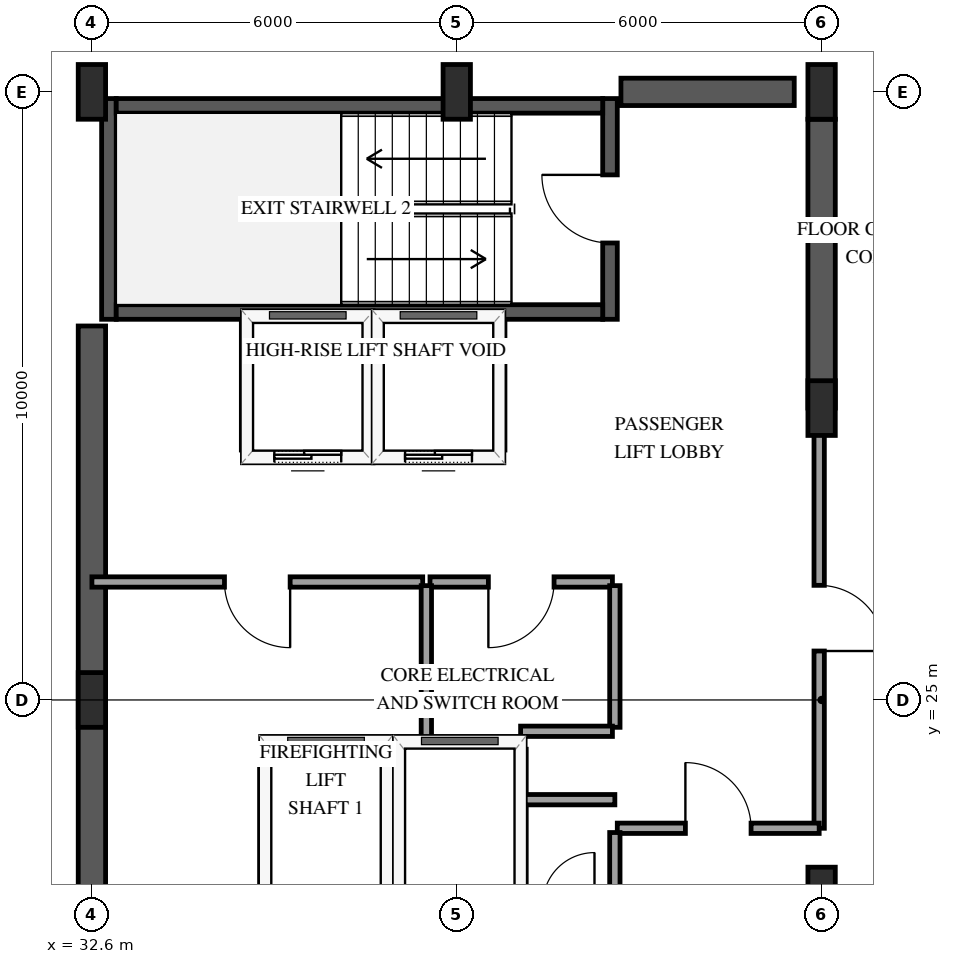
"""IFC4 building model, lengths in metres.
Left out: names, types, materials, properties, quantities, classifications, styles, units other than length and angle.
Written with IfcOpenShell. Run it as: python <this file> out.ifc"""

import sys

from ifc_helpers import new_model, si_unit, direction, frame, frame_2d, origin, origin_2d, place, context, subcontext, project, spatial, rectangle, extrude, element, fill, save


model = new_model("IFC4")
c1 = context("Model", 3, precision=1e-05, world=origin(), true_north=direction((0.0, 1.0)))
c2 = subcontext(c1, "Body", "Model", "MODEL_VIEW")
j1 = project(units=[si_unit("LENGTHUNIT", "METRE"), si_unit("PLANEANGLEUNIT", "RADIAN")], contexts=[c1])
p1 = place(None, origin())
s1 = spatial("IfcSite", under=j1, at=p1, CompositionType="ELEMENT")
p2 = place(p1, origin())
s2 = spatial("IfcBuilding", under=s1, at=p2, CompositionType="ELEMENT")
p3 = place(p2, frame((0.0, 0.0, 276.25)))
s3 = spatial("IfcBuildingStorey", under=s2, at=p3, CompositionType="ELEMENT", Elevation=276.25)
p4 = place(p3, frame((32.88, 31.26, 0.0), z_axis=(0.0, 0.0, 1.0), x_axis=(0.0, 1.0, 0.0)))
e1 = element("IfcWall", 1, at=p4, inside=s3, PredefinedType="SHEAR", context=c2, shape_type="SweptSolid", body=[
    extrude(rectangle(XDim=3.63, YDim=0.24, at=frame_2d((1.815, 0.0))), origin(), (0.0, 0.0, 1.0), 3.75),
])
p5 = place(p3, frame((41.12, 31.26, 0.0), z_axis=(0.0, 0.0, 1.0), x_axis=(0.0, 1.0, 0.0)))
e2 = element("IfcWall", 2, at=p5, inside=s3, PredefinedType="SHEAR", context=c2, shape_type="SweptSolid", body=[
    extrude(rectangle(XDim=3.63, YDim=0.24, at=frame_2d((1.815, 0.0))), origin(), (0.0, 0.0, 1.0), 3.75),
])
p6 = place(p5, frame((1.255, 0.0, 0.0)))
e3 = element("IfcOpeningElement", 3, at=p6, cuts=e2, PredefinedType="OPENING", context=c2, shape_type="SweptSolid", body=[
    extrude(rectangle(XDim=1.12, YDim=2.15, at=frame_2d((0.56, 1.075))), frame((0.0, 0.13, 0.0), z_axis=(0.0, -1.0, 0.0), x_axis=(1.0, 0.0, 0.0)), (0.0, 0.0, 1.0), 0.26),
])
for number, where, z_axis, x_axis in (
    (4, (33.0, 31.38, 0.0), (0.0, 0.0, 1.0), (1.0, 0.0, 0.0)),
    (5, (33.0, 34.77, 0.0), (0.0, 0.0, 1.0), (1.0, 0.0, 0.0)),
):
    element("IfcWall", number, at=place(p3, frame(where, z_axis=z_axis, x_axis=x_axis)), inside=s3, PredefinedType="SHEAR", context=c2, shape_type="SweptSolid", body=[
        extrude(rectangle(XDim=8.0, YDim=0.24, at=frame_2d((4.0, 0.0))), origin(), (0.0, 0.0, 1.0), 3.75),
    ])
p7 = place(p3, frame((32.6, 18.85, 0.0), z_axis=(0.0, 0.0, 1.0), x_axis=(0.0, 1.0, 0.0)))
e6 = element("IfcWall", 6, at=p7, inside=s3, PredefinedType="SHEAR", context=c2, shape_type="SweptSolid", body=[
    extrude(rectangle(XDim=12.3, YDim=0.45, at=frame_2d((6.15, 0.0))), origin(), (0.0, 0.0, 1.0), 3.75),
])
p8 = place(p3, frame((41.3, 35.0, 0.0), z_axis=(0.0, 0.0, 1.0), x_axis=(1.0, 0.0, 0.0)))
e7 = element("IfcWall", 7, at=p8, inside=s3, PredefinedType="SHEAR", context=c2, shape_type="SweptSolid", body=[
    extrude(rectangle(XDim=2.85, YDim=0.45, at=frame_2d((1.425, 0.0))), origin(), (0.0, 0.0, 1.0), 3.75),
])
p9 = place(p3, frame((44.6, 29.8, 0.0), z_axis=(0.0, 0.0, 1.0), x_axis=(0.0, 1.0, 0.0)))
e8 = element("IfcWall", 8, at=p9, inside=s3, PredefinedType="SHEAR", context=c2, shape_type="SweptSolid", body=[
    extrude(rectangle(XDim=4.75, YDim=0.45, at=frame_2d((2.375, 0.0))), origin(), (0.0, 0.0, 1.0), 3.75),
])
for number, where, z_axis, x_axis in (
    (9, (32.6, 25.0, 0.0), (0.0, 0.0, 1.0), (1.0, 0.0, 0.0)),
    (10, (32.6, 35.0, 0.0), (0.0, 0.0, 1.0), (1.0, 0.0, 0.0)),
    (11, (38.6, 35.0, 0.0), (0.0, 0.0, 1.0), (1.0, 0.0, 0.0)),
    (12, (44.6, 21.8, 0.0), (0.0, 0.0, 1.0), (1.0, 0.0, 0.0)),
    (13, (44.6, 29.8, 0.0), (0.0, 0.0, 1.0), (1.0, 0.0, 0.0)),
    (14, (44.6, 35.0, 0.0), (0.0, 0.0, 1.0), (1.0, 0.0, 0.0)),
):
    element("IfcColumn", number, at=place(p3, frame(where, z_axis=z_axis, x_axis=x_axis)), inside=s3, PredefinedType="PILASTER", context=c2, shape_type="SweptSolid", body=[
        extrude(rectangle(XDim=0.45, YDim=0.9, at=origin_2d()), origin(), (0.0, 0.0, 1.0), 3.75),
    ])
p10 = place(p3, frame((35.45, 24.3, 0.0), z_axis=(0.0, 0.0, 1.0), x_axis=(1.0, 0.0, 0.0)))
e15 = element("IfcWall", 15, at=p10, inside=s3, PredefinedType="SOLIDWALL", context=c2, shape_type="SweptSolid", body=[
    extrude(rectangle(XDim=2.0, YDim=0.185, at=frame_2d((1.0, 0.0))), origin(), (0.0, 0.0, 1.0), 3.45),
])
for number, where, z_axis, x_axis in (
    (16, (35.45, 21.81, 0.0), (0.0, 0.0, 1.0), (0.0, 1.0, 0.0)),
    (17, (37.45, 21.81, 0.0), (0.0, 0.0, 1.0), (0.0, 1.0, 0.0)),
):
    element("IfcWall", number, at=place(p3, frame(where, z_axis=z_axis, x_axis=x_axis)), inside=s3, PredefinedType="SOLIDWALL", context=c2, shape_type="SweptSolid", body=[
        extrude(rectangle(XDim=2.38, YDim=0.185, at=frame_2d((1.19, 0.0))), origin(), (0.0, 0.0, 1.0), 3.45),
    ])
p11 = place(p3, frame((37.65, 24.3, 0.0), z_axis=(0.0, 0.0, 1.0), x_axis=(1.0, 0.0, 0.0)))
e18 = element("IfcWall", 18, at=p11, inside=s3, PredefinedType="SOLIDWALL", context=c2, shape_type="SweptSolid", body=[
    extrude(rectangle(XDim=2.0, YDim=0.185, at=frame_2d((1.0, 0.0))), origin(), (0.0, 0.0, 1.0), 3.45),
])
p12 = place(p3, frame((39.65, 21.81, 0.0), z_axis=(0.0, 0.0, 1.0), x_axis=(0.0, 1.0, 0.0)))
e19 = element("IfcWall", 19, at=p12, inside=s3, PredefinedType="SOLIDWALL", context=c2, shape_type="SweptSolid", body=[
    extrude(rectangle(XDim=2.38, YDim=0.185, at=frame_2d((1.19, 0.0))), origin(), (0.0, 0.0, 1.0), 3.45),
])
p13 = place(p3, frame((35.15, 29.0, 0.0), z_axis=(0.0, 0.0, 1.0), x_axis=(1.0, 0.0, 0.0)))
e20 = element("IfcWall", 20, at=p13, inside=s3, PredefinedType="SOLIDWALL", context=c2, shape_type="SweptSolid", body=[
    extrude(rectangle(XDim=2.0, YDim=0.185, at=frame_2d((1.0, 0.0))), origin(), (0.0, 0.0, 1.0), 3.45),
])
p14 = place(p13, frame((0.45, 0.0, 0.0)))
e21 = element("IfcOpeningElement", 21, at=p14, cuts=e20, PredefinedType="OPENING", context=c2, shape_type="SweptSolid", body=[
    extrude(rectangle(XDim=1.1, YDim=2.15, at=frame_2d((0.55, 1.075))), frame((0.0, 0.103, 0.0), z_axis=(0.0, -1.0, 0.0), x_axis=(1.0, 0.0, 0.0)), (0.0, 0.0, 1.0), 0.205),
])
for number, where, z_axis, x_axis in (
    (22, (35.15, 29.11, 0.0), (0.0, 0.0, 1.0), (0.0, 1.0, 0.0)),
    (23, (37.15, 29.11, 0.0), (0.0, 0.0, 1.0), (0.0, 1.0, 0.0)),
):
    element("IfcWall", number, at=place(p3, frame(where, z_axis=z_axis, x_axis=x_axis)), inside=s3, PredefinedType="SOLIDWALL", context=c2, shape_type="SweptSolid", body=[
        extrude(rectangle(XDim=2.1, YDim=0.185, at=frame_2d((1.05, 0.0))), origin(), (0.0, 0.0, 1.0), 3.45),
    ])
p15 = place(p3, frame((37.3, 29.0, 0.0), z_axis=(0.0, 0.0, 1.0), x_axis=(1.0, 0.0, 0.0)))
e24 = element("IfcWall", 24, at=p15, inside=s3, PredefinedType="SOLIDWALL", context=c2, shape_type="SweptSolid", body=[
    extrude(rectangle(XDim=2.0, YDim=0.185, at=frame_2d((1.0, 0.0))), origin(), (0.0, 0.0, 1.0), 3.45),
])
p16 = place(p15, frame((0.45, 0.0, 0.0)))
e25 = element("IfcOpeningElement", 25, at=p16, cuts=e24, PredefinedType="OPENING", context=c2, shape_type="SweptSolid", body=[
    extrude(rectangle(XDim=1.1, YDim=2.15, at=frame_2d((0.55, 1.075))), frame((0.0, 0.103, 0.0), z_axis=(0.0, -1.0, 0.0), x_axis=(1.0, 0.0, 0.0)), (0.0, 0.0, 1.0), 0.205),
])
p17 = place(p3, frame((39.3, 29.11, 0.0), z_axis=(0.0, 0.0, 1.0), x_axis=(0.0, 1.0, 0.0)))
e26 = element("IfcWall", 26, at=p17, inside=s3, PredefinedType="SOLIDWALL", context=c2, shape_type="SweptSolid", body=[
    extrude(rectangle(XDim=2.1, YDim=0.185, at=frame_2d((1.05, 0.0))), origin(), (0.0, 0.0, 1.0), 3.45),
])
p18 = place(p3, frame((44.56, 29.8, 0.0), z_axis=(0.0, 0.0, 1.0), x_axis=(0.0, -1.0, 0.0)))
e27 = element("IfcWall", 27, at=p18, inside=s3, PredefinedType="PARTITIONING", context=c2, shape_type="SweptSolid", body=[
    extrude(rectangle(XDim=6.91, YDim=0.17, at=frame_2d((3.455, 0.0))), origin(), (0.0, 0.0, 1.0), 2.49),
])
p19 = place(p18, frame((2.915, 0.0, 0.0)))
e28 = element("IfcOpeningElement", 28, at=p19, cuts=e27, PredefinedType="OPENING", context=c2, shape_type="SweptSolid", body=[
    extrude(rectangle(XDim=1.08, YDim=2.15, at=frame_2d((0.54, 1.075))), frame((0.0, 0.095, 0.0), z_axis=(0.0, -1.0, 0.0), x_axis=(1.0, 0.0, 0.0)), (0.0, 0.0, 1.0), 0.19),
])
p20 = place(p3, frame((38.04, 26.94, 0.0), z_axis=(0.0, 0.0, 1.0), x_axis=(-1.0, 0.0, 0.0)))
e29 = element("IfcWall", 29, at=p20, inside=s3, PredefinedType="PARTITIONING", context=c2, shape_type="SweptSolid", body=[
    extrude(rectangle(XDim=5.44, YDim=0.17, at=frame_2d((2.72, 0.0))), origin(), (0.0, 0.0, 1.0), 3.45),
])
p21 = place(p20, frame((2.18, 0.0, 0.0)))
e30 = element("IfcOpeningElement", 30, at=p21, cuts=e29, PredefinedType="OPENING", context=c2, shape_type="SweptSolid", body=[
    extrude(rectangle(XDim=1.08, YDim=2.15, at=frame_2d((0.54, 1.075))), frame((0.0, 0.095, 0.0), z_axis=(0.0, -1.0, 0.0), x_axis=(1.0, 0.0, 0.0)), (0.0, 0.0, 1.0), 0.19),
])
p22 = place(p3, frame((41.24, 22.89, 0.0), z_axis=(0.0, 0.0, 1.0), x_axis=(1.0, 0.0, 0.0)))
e31 = element("IfcWall", 31, at=p22, inside=s3, PredefinedType="PARTITIONING", context=c2, shape_type="SweptSolid", body=[
    extrude(rectangle(XDim=3.32, YDim=0.17, at=frame_2d((1.66, 0.0))), origin(), (0.0, 0.0, 1.0), 3.45),
])
p23 = place(p22, frame((1.12, 0.0, 0.0)))
e32 = element("IfcOpeningElement", 32, at=p23, cuts=e31, PredefinedType="OPENING", context=c2, shape_type="SweptSolid", body=[
    extrude(rectangle(XDim=1.08, YDim=2.15, at=frame_2d((0.54, 1.075))), frame((0.0, 0.095, 0.0), z_axis=(0.0, -1.0, 0.0), x_axis=(1.0, 0.0, 0.0)), (0.0, 0.0, 1.0), 0.19),
])
p24 = place(p3, frame((41.16, 26.94, 0.0), z_axis=(0.0, 0.0, 1.0), x_axis=(-1.0, 0.0, 0.0)))
e33 = element("IfcWall", 33, at=p24, inside=s3, PredefinedType="PARTITIONING", context=c2, shape_type="SweptSolid", body=[
    extrude(rectangle(XDim=3.0, YDim=0.17, at=frame_2d((1.5, 0.0))), origin(), (0.0, 0.0, 1.0), 3.45),
])
p25 = place(p24, frame((0.96, 0.0, 0.0)))
e34 = element("IfcOpeningElement", 34, at=p25, cuts=e33, PredefinedType="OPENING", context=c2, shape_type="SweptSolid", body=[
    extrude(rectangle(XDim=1.08, YDim=2.15, at=frame_2d((0.54, 1.075))), frame((0.0, 0.095, 0.0), z_axis=(0.0, -1.0, 0.0), x_axis=(1.0, 0.0, 0.0)), (0.0, 0.0, 1.0), 0.19),
])
p26 = place(p3, frame((38.1, 26.88, 0.0), z_axis=(0.0, 0.0, 1.0), x_axis=(0.0, -1.0, 0.0)))
e35 = element("IfcWall", 35, at=p26, inside=s3, PredefinedType="PARTITIONING", context=c2, shape_type="SweptSolid", body=[
    extrude(rectangle(XDim=2.58, YDim=0.17, at=frame_2d((1.29, 0.0))), origin(), (0.0, 0.0, 1.0), 3.45),
])
p27 = place(p3, frame((41.2, 24.55, 0.0), z_axis=(0.0, 0.0, 1.0), x_axis=(0.0, 1.0, 0.0)))
e36 = element("IfcWall", 36, at=p27, inside=s3, PredefinedType="PARTITIONING", context=c2, shape_type="SweptSolid", body=[
    extrude(rectangle(XDim=2.33, YDim=0.17, at=frame_2d((1.165, 0.0))), origin(), (0.0, 0.0, 1.0), 3.45),
])
p28 = place(p3, frame((39.65, 24.485, 0.0), z_axis=(0.0, 0.0, 1.0), x_axis=(1.0, 0.0, 0.0)))
e37 = element("IfcWall", 37, at=p28, inside=s3, PredefinedType="PARTITIONING", context=c2, shape_type="SweptSolid", body=[
    extrude(rectangle(XDim=1.51, YDim=0.17, at=frame_2d((0.755, 0.0))), origin(), (0.0, 0.0, 1.0), 3.45),
])
p29 = place(p3, frame((41.2, 21.7, 0.0), z_axis=(0.0, 0.0, 1.0), x_axis=(0.0, 1.0, 0.0)))
e38 = element("IfcWall", 38, at=p29, inside=s3, PredefinedType="PARTITIONING", context=c2, shape_type="SweptSolid", body=[
    extrude(rectangle(XDim=1.12, YDim=0.17, at=frame_2d((0.56, 0.0))), origin(), (0.0, 0.0, 1.0), 3.45),
])
p30 = place(p3, frame((41.2, 23.36, 0.0), z_axis=(0.0, 0.0, 1.0), x_axis=(-1.0, 0.0, 0.0)))
e39 = element("IfcWall", 39, at=p30, inside=s3, PredefinedType="PARTITIONING", context=c2, shape_type="SweptSolid", body=[
    extrude(rectangle(XDim=1.48, YDim=0.17, at=frame_2d((0.74, 0.0))), origin(), (0.0, 0.0, 1.0), 3.45),
])
p31 = place(p14, origin())
e40 = element("IfcDoor", 40, at=p31, inside=s3, OperationType="SLIDING_TO_LEFT", PredefinedType="DOOR", context=c2, shape_type="SweptSolid", body=[
    extrude(rectangle(XDim=1.1, YDim=2.15, at=frame_2d((0.55, 1.075))), frame((0.0, 0.025, 0.0), z_axis=(0.0, -1.0, 0.0), x_axis=(1.0, 0.0, 0.0)), (0.0, 0.0, 1.0), 0.05),
])
fill(e21, e40)
p32 = place(p16, origin())
e41 = element("IfcDoor", 41, at=p32, inside=s3, OperationType="SLIDING_TO_LEFT", PredefinedType="DOOR", context=c2, shape_type="SweptSolid", body=[
    extrude(rectangle(XDim=1.1, YDim=2.15, at=frame_2d((0.55, 1.075))), frame((0.0, 0.025, 0.0), z_axis=(0.0, -1.0, 0.0), x_axis=(1.0, 0.0, 0.0)), (0.0, 0.0, 1.0), 0.05),
])
fill(e25, e41)
p33 = place(p6, origin())
e42 = element("IfcDoor", 42, at=p33, inside=s3, OperationType="SINGLE_SWING_RIGHT", PredefinedType="DOOR", context=c2, shape_type="SweptSolid", body=[
    extrude(rectangle(XDim=1.12, YDim=2.15, at=frame_2d((0.56, 1.075))), frame((0.0, 0.025, 0.0), z_axis=(0.0, -1.0, 0.0), x_axis=(1.0, 0.0, 0.0)), (0.0, 0.0, 1.0), 0.05),
])
fill(e3, e42)
p34 = place(p19, origin())
e43 = element("IfcDoor", 43, at=p34, inside=s3, OperationType="SINGLE_SWING_RIGHT", PredefinedType="DOOR", context=c2, shape_type="SweptSolid", body=[
    extrude(rectangle(XDim=1.08, YDim=2.15, at=frame_2d((0.54, 1.075))), frame((0.0, 0.025, 0.0), z_axis=(0.0, -1.0, 0.0), x_axis=(1.0, 0.0, 0.0)), (0.0, 0.0, 1.0), 0.05),
])
fill(e28, e43)
p35 = place(p21, origin())
e44 = element("IfcDoor", 44, at=p35, inside=s3, OperationType="SINGLE_SWING_LEFT", PredefinedType="DOOR", context=c2, shape_type="SweptSolid", body=[
    extrude(rectangle(XDim=1.08, YDim=2.15, at=frame_2d((0.54, 1.075))), frame((0.0, 0.025, 0.0), z_axis=(0.0, -1.0, 0.0), x_axis=(1.0, 0.0, 0.0)), (0.0, 0.0, 1.0), 0.05),
])
fill(e30, e44)
p36 = place(p23, origin())
e45 = element("IfcDoor", 45, at=p36, inside=s3, OperationType="SINGLE_SWING_LEFT", PredefinedType="DOOR", context=c2, shape_type="SweptSolid", body=[
    extrude(rectangle(XDim=1.08, YDim=2.15, at=frame_2d((0.54, 1.075))), frame((0.0, 0.025, 0.0), z_axis=(0.0, -1.0, 0.0), x_axis=(1.0, 0.0, 0.0)), (0.0, 0.0, 1.0), 0.05),
])
fill(e32, e45)
p37 = place(p25, origin())
e46 = element("IfcDoor", 46, at=p37, inside=s3, OperationType="SINGLE_SWING_RIGHT", PredefinedType="DOOR", context=c2, shape_type="SweptSolid", body=[
    extrude(rectangle(XDim=1.08, YDim=2.15, at=frame_2d((0.54, 1.075))), frame((0.0, 0.025, 0.0), z_axis=(0.0, -1.0, 0.0), x_axis=(1.0, 0.0, 0.0)), (0.0, 0.0, 1.0), 0.05),
])
fill(e34, e46)
save(model, sys.argv[1])
